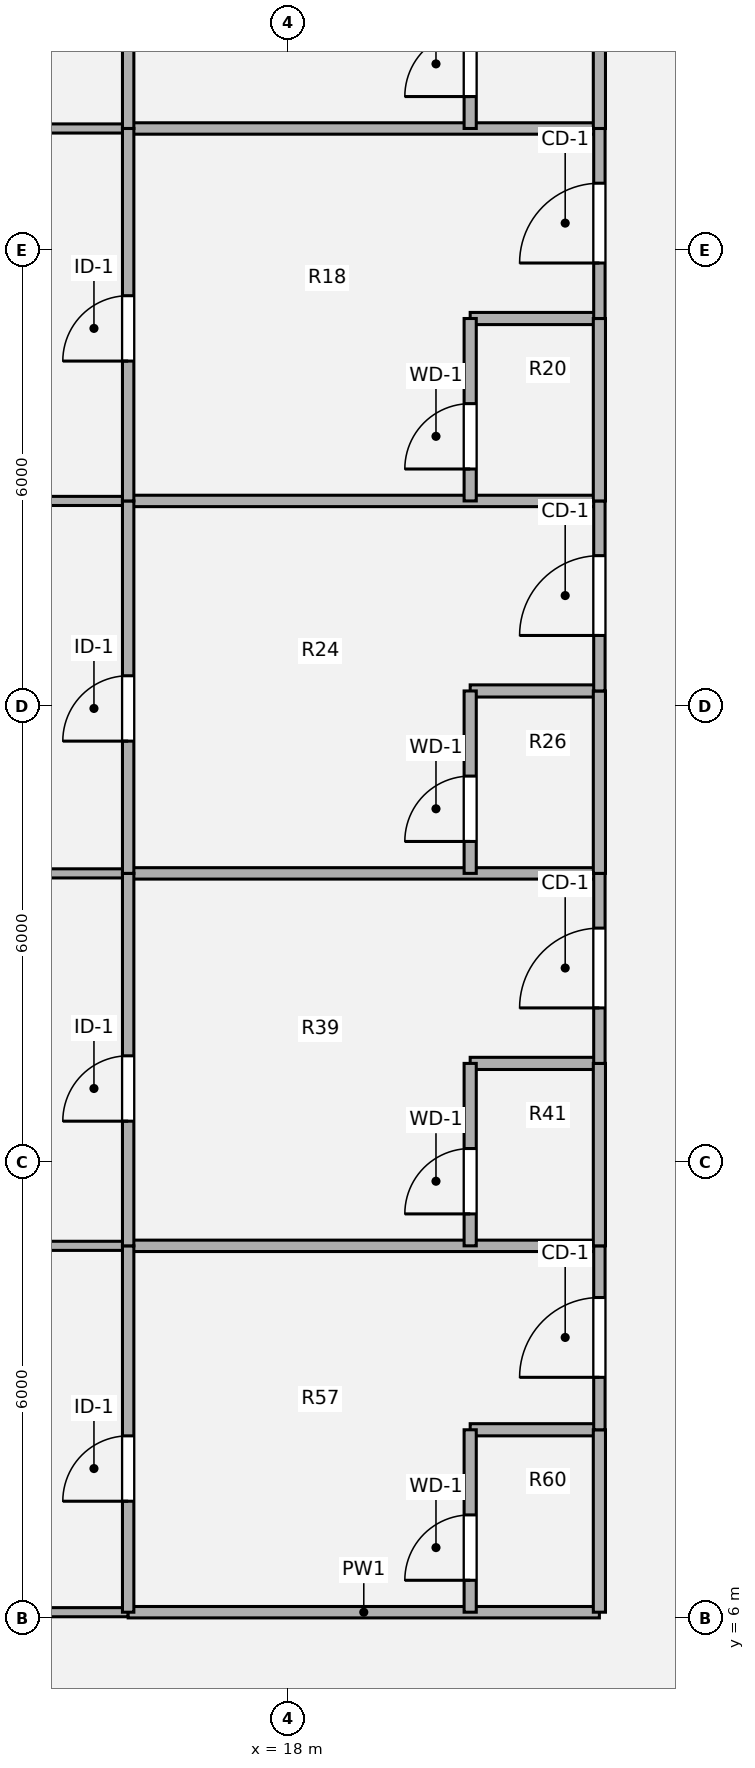
"""IFC4 building model, lengths in metres.
Left out: names, types, materials, properties, quantities, classifications, styles, units other than length and angle.
Written with IfcOpenShell. Run it as: python <this file> out.ifc"""

import sys

from ifc_helpers import new_model, si_unit, direction, frame, frame_2d, origin, origin_2d, place, context, subcontext, project, spatial, rectangle, extrude, source, transform, mapped, element, fill, save


model = new_model("IFC4")
c1 = context("Model", 3, precision=1e-05, world=origin(), true_north=direction((0.0, 1.0)))
c2 = subcontext(c1, "Body", "Model", "MODEL_VIEW")
j1 = project(units=[si_unit("LENGTHUNIT", "METRE"), si_unit("PLANEANGLEUNIT", "RADIAN")], contexts=[c1])
p1 = place(None, origin())
s1 = spatial("IfcSite", under=j1, at=p1, CompositionType="ELEMENT")
p2 = place(p1, origin())
s2 = spatial("IfcBuilding", under=s1, at=p2, CompositionType="ELEMENT")
p3 = place(p2, frame((0.0, 0.0, 64.8)))
s3 = spatial("IfcBuildingStorey", under=s2, at=p3, CompositionType="ELEMENT", Elevation=64.8)
p4 = place(p3, frame((12.08, 6.08, 0.0), z_axis=(0.0, 0.0, 1.0), x_axis=(1.0, 0.0, 0.0)))
e1 = element("IfcWall", 1, at=p4, inside=s3, PredefinedType="PARTITIONING", context=c2, shape_type="SweptSolid", body=[
    extrude(rectangle(XDim=3.82, YDim=0.12, at=frame_2d((1.91, 0.0))), origin(), (0.0, 0.0, 1.0), 3.5),
])
p5 = place(p3, frame((15.9, 6.08, 0.0), z_axis=(0.0, 0.0, 1.0), x_axis=(1.0, 0.0, 0.0)))
e2 = element("IfcWall", 2, at=p5, inside=s3, PredefinedType="PARTITIONING", context=c2, shape_type="SweptSolid", body=[
    extrude(rectangle(XDim=6.2, YDim=0.15, at=frame_2d((3.1, 0.0))), origin(), (0.0, 0.0, 1.0), 3.5),
])
p6 = place(p3, frame((20.4, 8.48, 0.0), z_axis=(0.0, 0.0, 1.0), x_axis=(1.0, 0.0, 0.0)))
e3 = element("IfcWall", 3, at=p6, inside=s3, PredefinedType="PLUMBINGWALL", context=c2, shape_type="SweptSolid", body=[
    extrude(rectangle(XDim=1.7, YDim=0.16, at=frame_2d((0.85, 0.0))), origin(), (0.0, 0.0, 1.0), 3.5),
])
p7 = place(p3, frame((12.08, 10.9, 0.0), z_axis=(0.0, 0.0, 1.0), x_axis=(1.0, 0.0, 0.0)))
e4 = element("IfcWall", 4, at=p7, inside=s3, PredefinedType="PARTITIONING", context=c2, shape_type="SweptSolid", body=[
    extrude(rectangle(XDim=3.82, YDim=0.12, at=frame_2d((1.91, 0.0))), origin(), (0.0, 0.0, 1.0), 3.5),
])
p8 = place(p3, frame((15.9, 10.9, 0.0), z_axis=(0.0, 0.0, 1.0), x_axis=(1.0, 0.0, 0.0)))
e5 = element("IfcWall", 5, at=p8, inside=s3, PredefinedType="PARTITIONING", context=c2, shape_type="SweptSolid", body=[
    extrude(rectangle(XDim=6.2, YDim=0.15, at=frame_2d((3.1, 0.0))), origin(), (0.0, 0.0, 1.0), 3.5),
])
p9 = place(p3, frame((20.4, 13.3, 0.0), z_axis=(0.0, 0.0, 1.0), x_axis=(1.0, 0.0, 0.0)))
e6 = element("IfcWall", 6, at=p9, inside=s3, PredefinedType="PLUMBINGWALL", context=c2, shape_type="SweptSolid", body=[
    extrude(rectangle(XDim=1.7, YDim=0.16, at=frame_2d((0.85, 0.0))), origin(), (0.0, 0.0, 1.0), 3.5),
])
p10 = place(p3, frame((12.08, 15.8, 0.0), z_axis=(0.0, 0.0, 1.0), x_axis=(1.0, 0.0, 0.0)))
e7 = element("IfcWall", 7, at=p10, inside=s3, PredefinedType="PARTITIONING", context=c2, shape_type="SweptSolid", body=[
    extrude(rectangle(XDim=3.82, YDim=0.12, at=frame_2d((1.91, 0.0))), origin(), (0.0, 0.0, 1.0), 3.5),
])
p11 = place(p3, frame((15.9, 15.8, 0.0), z_axis=(0.0, 0.0, 1.0), x_axis=(1.0, 0.0, 0.0)))
e8 = element("IfcWall", 8, at=p11, inside=s3, PredefinedType="PARTITIONING", context=c2, shape_type="SweptSolid", body=[
    extrude(rectangle(XDim=6.2, YDim=0.15, at=frame_2d((3.1, 0.0))), origin(), (0.0, 0.0, 1.0), 3.5),
])
p12 = place(p3, frame((20.4, 18.2, 0.0), z_axis=(0.0, 0.0, 1.0), x_axis=(1.0, 0.0, 0.0)))
e9 = element("IfcWall", 9, at=p12, inside=s3, PredefinedType="PLUMBINGWALL", context=c2, shape_type="SweptSolid", body=[
    extrude(rectangle(XDim=1.7, YDim=0.16, at=frame_2d((0.85, 0.0))), origin(), (0.0, 0.0, 1.0), 2.715),
])
p13 = place(p3, frame((12.08, 20.7, 0.0), z_axis=(0.0, 0.0, 1.0), x_axis=(1.0, 0.0, 0.0)))
e10 = element("IfcWall", 10, at=p13, inside=s3, PredefinedType="PARTITIONING", context=c2, shape_type="SweptSolid", body=[
    extrude(rectangle(XDim=3.82, YDim=0.12, at=frame_2d((1.91, 0.0))), origin(), (0.0, 0.0, 1.0), 2.982),
])
p14 = place(p3, frame((15.9, 20.7, 0.0), z_axis=(0.0, 0.0, 1.0), x_axis=(1.0, 0.0, 0.0)))
e11 = element("IfcWall", 11, at=p14, inside=s3, PredefinedType="PARTITIONING", context=c2, shape_type="SweptSolid", body=[
    extrude(rectangle(XDim=6.2, YDim=0.15, at=frame_2d((3.1, 0.0))), origin(), (0.0, 0.0, 1.0), 2.982),
])
p15 = place(p3, frame((20.4, 23.1, 0.0), z_axis=(0.0, 0.0, 1.0), x_axis=(1.0, 0.0, 0.0)))
e12 = element("IfcWall", 12, at=p15, inside=s3, PredefinedType="PLUMBINGWALL", context=c2, shape_type="SweptSolid", body=[
    extrude(rectangle(XDim=1.7, YDim=0.16, at=frame_2d((0.85, 0.0))), origin(), (0.0, 0.0, 1.0), 3.055),
])
p16 = place(p3, frame((12.08, 25.6, 0.0), z_axis=(0.0, 0.0, 1.0), x_axis=(1.0, 0.0, 0.0)))
e13 = element("IfcWall", 13, at=p16, inside=s3, PredefinedType="PARTITIONING", context=c2, shape_type="SweptSolid", body=[
    extrude(rectangle(XDim=3.82, YDim=0.12, at=frame_2d((1.91, 0.0))), origin(), (0.0, 0.0, 1.0), 2.982),
])
p17 = place(p3, frame((15.9, 25.6, 0.0), z_axis=(0.0, 0.0, 1.0), x_axis=(1.0, 0.0, 0.0)))
e14 = element("IfcWall", 14, at=p17, inside=s3, PredefinedType="PARTITIONING", context=c2, shape_type="SweptSolid", body=[
    extrude(rectangle(XDim=6.2, YDim=0.15, at=frame_2d((3.1, 0.0))), origin(), (0.0, 0.0, 1.0), 2.982),
])
p18 = place(p3, frame((15.9, 6.08, 0.0), z_axis=(0.0, 0.0, 1.0), x_axis=(0.0, 1.0, 0.0)))
e15 = element("IfcWall", 15, at=p18, inside=s3, PredefinedType="PARTITIONING", context=c2, shape_type="SweptSolid", body=[
    extrude(rectangle(XDim=4.82, YDim=0.15, at=frame_2d((2.41, 0.0))), origin(), (0.0, 0.0, 1.0), 3.5),
])
p19 = place(p18, frame((1.46, 0.0, 0.0)))
e16 = element("IfcOpeningElement", 16, at=p19, cuts=e15, PredefinedType="OPENING", context=c2, shape_type="SweptSolid", body=[
    extrude(rectangle(XDim=0.86, YDim=2.1, at=origin_2d()), frame((0.43, 0.085, 1.05), z_axis=(0.0, -1.0, 0.0), x_axis=(1.0, 0.0, 0.0)), (0.0, 0.0, 1.0), 0.17),
])
p20 = place(p3, frame((15.9, 10.9, 0.0), z_axis=(0.0, 0.0, 1.0), x_axis=(0.0, 1.0, 0.0)))
e17 = element("IfcWall", 17, at=p20, inside=s3, PredefinedType="PARTITIONING", context=c2, shape_type="SweptSolid", body=[
    extrude(rectangle(XDim=4.9, YDim=0.15, at=frame_2d((2.45, 0.0))), origin(), (0.0, 0.0, 1.0), 3.5),
])
p21 = place(p20, frame((1.64, 0.0, 0.0)))
e18 = element("IfcOpeningElement", 18, at=p21, cuts=e17, PredefinedType="OPENING", context=c2, shape_type="SweptSolid", body=[
    extrude(rectangle(XDim=0.86, YDim=2.1, at=origin_2d()), frame((0.43, 0.085, 1.05), z_axis=(0.0, -1.0, 0.0), x_axis=(1.0, 0.0, 0.0)), (0.0, 0.0, 1.0), 0.17),
])
p22 = place(p3, frame((15.9, 15.8, 0.0), z_axis=(0.0, 0.0, 1.0), x_axis=(0.0, 1.0, 0.0)))
e19 = element("IfcWall", 19, at=p22, inside=s3, PredefinedType="PARTITIONING", context=c2, shape_type="SweptSolid", body=[
    extrude(rectangle(XDim=4.9, YDim=0.15, at=frame_2d((2.45, 0.0))), origin(), (0.0, 0.0, 1.0), 3.5),
])
p23 = place(p22, frame((1.74, 0.0, 0.0)))
e20 = element("IfcOpeningElement", 20, at=p23, cuts=e19, PredefinedType="OPENING", context=c2, shape_type="SweptSolid", body=[
    extrude(rectangle(XDim=0.86, YDim=2.1, at=origin_2d()), frame((0.43, 0.085, 1.05), z_axis=(0.0, -1.0, 0.0), x_axis=(1.0, 0.0, 0.0)), (0.0, 0.0, 1.0), 0.17),
])
p24 = place(p3, frame((15.9, 20.7, 0.0), z_axis=(0.0, 0.0, 1.0), x_axis=(0.0, 1.0, 0.0)))
e21 = element("IfcWall", 21, at=p24, inside=s3, PredefinedType="PARTITIONING", context=c2, shape_type="SweptSolid", body=[
    extrude(rectangle(XDim=4.9, YDim=0.15, at=frame_2d((2.45, 0.0))), origin(), (0.0, 0.0, 1.0), 3.5),
])
p25 = place(p24, frame((1.84, 0.0, 0.0)))
e22 = element("IfcOpeningElement", 22, at=p25, cuts=e21, PredefinedType="OPENING", context=c2, shape_type="SweptSolid", body=[
    extrude(rectangle(XDim=0.86, YDim=2.1, at=origin_2d()), frame((0.43, 0.085, 1.05), z_axis=(0.0, -1.0, 0.0), x_axis=(1.0, 0.0, 0.0)), (0.0, 0.0, 1.0), 0.17),
])
p26 = place(p3, frame((15.9, 25.6, 0.0), z_axis=(0.0, 0.0, 1.0), x_axis=(0.0, 1.0, 0.0)))
e23 = element("IfcWall", 23, at=p26, inside=s3, PredefinedType="PARTITIONING", context=c2, shape_type="SweptSolid", body=[
    extrude(rectangle(XDim=4.9, YDim=0.15, at=frame_2d((2.45, 0.0))), origin(), (0.0, 0.0, 1.0), 3.5),
])
p27 = place(p26, frame((1.94, 0.0, 0.0)))
e24 = element("IfcOpeningElement", 24, at=p27, cuts=e23, PredefinedType="OPENING", context=c2, shape_type="SweptSolid", body=[
    extrude(rectangle(XDim=0.86, YDim=2.1, at=origin_2d()), frame((0.43, 0.085, 1.05), z_axis=(0.0, -1.0, 0.0), x_axis=(1.0, 0.0, 0.0)), (0.0, 0.0, 1.0), 0.17),
])
p28 = place(p3, frame((20.4, 6.08, 0.0), z_axis=(0.0, 0.0, 1.0), x_axis=(0.0, 1.0, 0.0)))
e25 = element("IfcWall", 25, at=p28, inside=s3, PredefinedType="PLUMBINGWALL", context=c2, shape_type="SweptSolid", body=[
    extrude(rectangle(XDim=2.4, YDim=0.16, at=frame_2d((1.2, 0.0))), origin(), (0.0, 0.0, 1.0), 3.5),
])
p29 = place(p28, frame((0.42, 0.0, 0.0)))
e26 = element("IfcOpeningElement", 26, at=p29, cuts=e25, PredefinedType="OPENING", context=c2, shape_type="SweptSolid", body=[
    extrude(rectangle(XDim=0.86, YDim=2.1, at=origin_2d()), frame((0.43, 0.09, 1.05), z_axis=(0.0, -1.0, 0.0), x_axis=(1.0, 0.0, 0.0)), (0.0, 0.0, 1.0), 0.18),
])
p30 = place(p3, frame((20.4, 10.9, 0.0), z_axis=(0.0, 0.0, 1.0), x_axis=(0.0, 1.0, 0.0)))
e27 = element("IfcWall", 27, at=p30, inside=s3, PredefinedType="PLUMBINGWALL", context=c2, shape_type="SweptSolid", body=[
    extrude(rectangle(XDim=2.4, YDim=0.16, at=frame_2d((1.2, 0.0))), origin(), (0.0, 0.0, 1.0), 3.5),
])
p31 = place(p30, frame((0.42, 0.0, 0.0)))
e28 = element("IfcOpeningElement", 28, at=p31, cuts=e27, PredefinedType="OPENING", context=c2, shape_type="SweptSolid", body=[
    extrude(rectangle(XDim=0.86, YDim=2.1, at=origin_2d()), frame((0.43, 0.09, 1.05), z_axis=(0.0, -1.0, 0.0), x_axis=(1.0, 0.0, 0.0)), (0.0, 0.0, 1.0), 0.18),
])
p32 = place(p3, frame((20.4, 15.8, 0.0), z_axis=(0.0, 0.0, 1.0), x_axis=(0.0, 1.0, 0.0)))
e29 = element("IfcWall", 29, at=p32, inside=s3, PredefinedType="PLUMBINGWALL", context=c2, shape_type="SweptSolid", body=[
    extrude(rectangle(XDim=2.4, YDim=0.16, at=frame_2d((1.2, 0.0))), origin(), (0.0, 0.0, 1.0), 3.5),
])
p33 = place(p32, frame((0.42, 0.0, 0.0)))
e30 = element("IfcOpeningElement", 30, at=p33, cuts=e29, PredefinedType="OPENING", context=c2, shape_type="SweptSolid", body=[
    extrude(rectangle(XDim=0.86, YDim=2.1, at=origin_2d()), frame((0.43, 0.09, 1.05), z_axis=(0.0, -1.0, 0.0), x_axis=(1.0, 0.0, 0.0)), (0.0, 0.0, 1.0), 0.18),
])
p34 = place(p3, frame((20.4, 20.7, 0.0), z_axis=(0.0, 0.0, 1.0), x_axis=(0.0, 1.0, 0.0)))
e31 = element("IfcWall", 31, at=p34, inside=s3, PredefinedType="PLUMBINGWALL", context=c2, shape_type="SweptSolid", body=[
    extrude(rectangle(XDim=2.4, YDim=0.16, at=frame_2d((1.2, 0.0))), origin(), (0.0, 0.0, 1.0), 3.5),
])
p35 = place(p34, frame((0.42, 0.0, 0.0)))
e32 = element("IfcOpeningElement", 32, at=p35, cuts=e31, PredefinedType="OPENING", context=c2, shape_type="SweptSolid", body=[
    extrude(rectangle(XDim=0.86, YDim=2.1, at=origin_2d()), frame((0.43, 0.09, 1.05), z_axis=(0.0, -1.0, 0.0), x_axis=(1.0, 0.0, 0.0)), (0.0, 0.0, 1.0), 0.18),
])
p36 = place(p3, frame((20.4, 25.6, 0.0), z_axis=(0.0, 0.0, 1.0), x_axis=(0.0, 1.0, 0.0)))
e33 = element("IfcWall", 33, at=p36, inside=s3, PredefinedType="PLUMBINGWALL", context=c2, shape_type="SweptSolid", body=[
    extrude(rectangle(XDim=2.4, YDim=0.16, at=frame_2d((1.2, 0.0))), origin(), (0.0, 0.0, 1.0), 3.5),
])
p37 = place(p36, frame((0.42, 0.0, 0.0)))
e34 = element("IfcOpeningElement", 34, at=p37, cuts=e33, PredefinedType="OPENING", context=c2, shape_type="SweptSolid", body=[
    extrude(rectangle(XDim=0.86, YDim=2.1, at=origin_2d()), frame((0.43, 0.09, 1.05), z_axis=(0.0, -1.0, 0.0), x_axis=(1.0, 0.0, 0.0)), (0.0, 0.0, 1.0), 0.18),
])
p38 = place(p3, frame((22.1, 6.08, 0.0), z_axis=(0.0, 0.0, 1.0), x_axis=(0.0, 1.0, 0.0)))
e35 = element("IfcWall", 35, at=p38, inside=s3, PredefinedType="PLUMBINGWALL", context=c2, shape_type="SweptSolid", body=[
    extrude(rectangle(XDim=2.4, YDim=0.16, at=frame_2d((1.2, 0.0))), origin(), (0.0, 0.0, 1.0), 3.5),
])
p39 = place(p3, frame((22.1, 8.48, 0.0), z_axis=(0.0, 0.0, 1.0), x_axis=(0.0, 1.0, 0.0)))
e36 = element("IfcWall", 36, at=p39, inside=s3, PredefinedType="PARTITIONING", context=c2, shape_type="SweptSolid", body=[
    extrude(rectangle(XDim=2.42, YDim=0.15, at=frame_2d((1.21, 0.0))), origin(), (0.0, 0.0, 1.0), 3.5),
])
p40 = place(p39, frame((0.69, 0.0, 0.0)))
e37 = element("IfcOpeningElement", 37, at=p40, cuts=e36, PredefinedType="OPENING", context=c2, shape_type="SweptSolid", body=[
    extrude(rectangle(XDim=1.05, YDim=2.1, at=origin_2d()), frame((0.525, 0.085, 1.05), z_axis=(0.0, -1.0, 0.0), x_axis=(1.0, 0.0, 0.0)), (0.0, 0.0, 1.0), 0.17),
])
p41 = place(p3, frame((22.1, 10.9, 0.0), z_axis=(0.0, 0.0, 1.0), x_axis=(0.0, 1.0, 0.0)))
e38 = element("IfcWall", 38, at=p41, inside=s3, PredefinedType="PLUMBINGWALL", context=c2, shape_type="SweptSolid", body=[
    extrude(rectangle(XDim=2.4, YDim=0.16, at=frame_2d((1.2, 0.0))), origin(), (0.0, 0.0, 1.0), 3.5),
])
p42 = place(p3, frame((22.1, 13.3, 0.0), z_axis=(0.0, 0.0, 1.0), x_axis=(0.0, 1.0, 0.0)))
e39 = element("IfcWall", 39, at=p42, inside=s3, PredefinedType="PARTITIONING", context=c2, shape_type="SweptSolid", body=[
    extrude(rectangle(XDim=2.5, YDim=0.15, at=frame_2d((1.25, 0.0))), origin(), (0.0, 0.0, 1.0), 3.5),
])
p43 = place(p42, frame((0.73, 0.0, 0.0)))
e40 = element("IfcOpeningElement", 40, at=p43, cuts=e39, PredefinedType="OPENING", context=c2, shape_type="SweptSolid", body=[
    extrude(rectangle(XDim=1.05, YDim=2.1, at=origin_2d()), frame((0.525, 0.085, 1.05), z_axis=(0.0, -1.0, 0.0), x_axis=(1.0, 0.0, 0.0)), (0.0, 0.0, 1.0), 0.17),
])
p44 = place(p3, frame((22.1, 15.8, 0.0), z_axis=(0.0, 0.0, 1.0), x_axis=(0.0, 1.0, 0.0)))
e41 = element("IfcWall", 41, at=p44, inside=s3, PredefinedType="PLUMBINGWALL", context=c2, shape_type="SweptSolid", body=[
    extrude(rectangle(XDim=2.4, YDim=0.16, at=frame_2d((1.2, 0.0))), origin(), (0.0, 0.0, 1.0), 3.5),
])
p45 = place(p3, frame((22.1, 18.2, 0.0), z_axis=(0.0, 0.0, 1.0), x_axis=(0.0, 1.0, 0.0)))
e42 = element("IfcWall", 42, at=p45, inside=s3, PredefinedType="PARTITIONING", context=c2, shape_type="SweptSolid", body=[
    extrude(rectangle(XDim=2.5, YDim=0.15, at=frame_2d((1.25, 0.0))), origin(), (0.0, 0.0, 1.0), 3.5),
])
p46 = place(p45, frame((0.73, 0.0, 0.0)))
e43 = element("IfcOpeningElement", 43, at=p46, cuts=e42, PredefinedType="OPENING", context=c2, shape_type="SweptSolid", body=[
    extrude(rectangle(XDim=1.05, YDim=2.1, at=origin_2d()), frame((0.525, 0.085, 1.05), z_axis=(0.0, -1.0, 0.0), x_axis=(1.0, 0.0, 0.0)), (0.0, 0.0, 1.0), 0.17),
])
p47 = place(p3, frame((22.1, 20.7, 0.0), z_axis=(0.0, 0.0, 1.0), x_axis=(0.0, 1.0, 0.0)))
e44 = element("IfcWall", 44, at=p47, inside=s3, PredefinedType="PLUMBINGWALL", context=c2, shape_type="SweptSolid", body=[
    extrude(rectangle(XDim=2.4, YDim=0.16, at=frame_2d((1.2, 0.0))), origin(), (0.0, 0.0, 1.0), 3.5),
])
p48 = place(p3, frame((22.1, 23.1, 0.0), z_axis=(0.0, 0.0, 1.0), x_axis=(0.0, 1.0, 0.0)))
e45 = element("IfcWall", 45, at=p48, inside=s3, PredefinedType="PARTITIONING", context=c2, shape_type="SweptSolid", body=[
    extrude(rectangle(XDim=2.5, YDim=0.15, at=frame_2d((1.25, 0.0))), origin(), (0.0, 0.0, 1.0), 3.5),
])
p49 = place(p48, frame((0.73, 0.0, 0.0)))
e46 = element("IfcOpeningElement", 46, at=p49, cuts=e45, PredefinedType="OPENING", context=c2, shape_type="SweptSolid", body=[
    extrude(rectangle(XDim=1.05, YDim=2.1, at=origin_2d()), frame((0.525, 0.085, 1.05), z_axis=(0.0, -1.0, 0.0), x_axis=(1.0, 0.0, 0.0)), (0.0, 0.0, 1.0), 0.17),
])
p50 = place(p3, frame((22.1, 25.6, 0.0), z_axis=(0.0, 0.0, 1.0), x_axis=(0.0, 1.0, 0.0)))
e47 = element("IfcWall", 47, at=p50, inside=s3, PredefinedType="PLUMBINGWALL", context=c2, shape_type="SweptSolid", body=[
    extrude(rectangle(XDim=2.4, YDim=0.16, at=frame_2d((1.2, 0.0))), origin(), (0.0, 0.0, 1.0), 3.5),
])
m1 = source(origin(), c2, "Body", "SweptSolid", [
    extrude(rectangle(XDim=0.86, YDim=2.1, at=origin_2d()), frame((0.43, 0.025, 1.05), z_axis=(0.0, -1.0, 0.0), x_axis=(1.0, 0.0, 0.0)), (0.0, 0.0, 1.0), 0.05),
])
p51 = place(p19, origin())
e48 = element("IfcDoor", 48, at=p51, inside=s3, OperationType="SINGLE_SWING_LEFT", PredefinedType="DOOR", context=c2, shape_type="MappedRepresentation", body=[
    mapped(m1, transform((0.0, 0.0, 0.0), x_axis=(1.0, 0.0, 0.0), y_axis=(0.0, 1.0, 0.0), z_axis=(0.0, 0.0, 1.0), scale=1.0)),
])
fill(e16, e48)
p52 = place(p21, origin())
e49 = element("IfcDoor", 49, at=p52, inside=s3, OperationType="SINGLE_SWING_LEFT", PredefinedType="DOOR", context=c2, shape_type="MappedRepresentation", body=[
    mapped(m1, transform((0.0, 0.0, 0.0), x_axis=(1.0, 0.0, 0.0), y_axis=(0.0, 1.0, 0.0), z_axis=(0.0, 0.0, 1.0), scale=1.0)),
])
fill(e18, e49)
p53 = place(p23, origin())
e50 = element("IfcDoor", 50, at=p53, inside=s3, OperationType="SINGLE_SWING_LEFT", PredefinedType="DOOR", context=c2, shape_type="MappedRepresentation", body=[
    mapped(m1, transform((0.0, 0.0, 0.0), x_axis=(1.0, 0.0, 0.0), y_axis=(0.0, 1.0, 0.0), z_axis=(0.0, 0.0, 1.0), scale=1.0)),
])
fill(e20, e50)
p54 = place(p25, origin())
e51 = element("IfcDoor", 51, at=p54, inside=s3, OperationType="SINGLE_SWING_LEFT", PredefinedType="DOOR", context=c2, shape_type="MappedRepresentation", body=[
    mapped(m1, transform((0.0, 0.0, 0.0), x_axis=(1.0, 0.0, 0.0), y_axis=(0.0, 1.0, 0.0), z_axis=(0.0, 0.0, 1.0), scale=1.0)),
])
fill(e22, e51)
m2 = source(origin(), c2, "Body", "SweptSolid", [
    extrude(rectangle(XDim=0.86, YDim=2.1, at=origin_2d()), frame((0.43, 0.025, 1.05), z_axis=(0.0, -1.0, 0.0), x_axis=(1.0, 0.0, 0.0)), (0.0, 0.0, 1.0), 0.05),
])
p55 = place(p29, origin())
e52 = element("IfcDoor", 52, at=p55, inside=s3, OperationType="SINGLE_SWING_LEFT", PredefinedType="DOOR", context=c2, shape_type="MappedRepresentation", body=[
    mapped(m2, transform((0.0, 0.0, 0.0), x_axis=(1.0, 0.0, 0.0), y_axis=(0.0, 1.0, 0.0), z_axis=(0.0, 0.0, 1.0), scale=1.0)),
])
fill(e26, e52)
p56 = place(p31, origin())
e53 = element("IfcDoor", 53, at=p56, inside=s3, OperationType="SINGLE_SWING_LEFT", PredefinedType="DOOR", context=c2, shape_type="MappedRepresentation", body=[
    mapped(m2, transform((0.0, 0.0, 0.0), x_axis=(1.0, 0.0, 0.0), y_axis=(0.0, 1.0, 0.0), z_axis=(0.0, 0.0, 1.0), scale=1.0)),
])
fill(e28, e53)
p57 = place(p33, origin())
e54 = element("IfcDoor", 54, at=p57, inside=s3, OperationType="SINGLE_SWING_LEFT", PredefinedType="DOOR", context=c2, shape_type="MappedRepresentation", body=[
    mapped(m2, transform((0.0, 0.0, 0.0), x_axis=(1.0, 0.0, 0.0), y_axis=(0.0, 1.0, 0.0), z_axis=(0.0, 0.0, 1.0), scale=1.0)),
])
fill(e30, e54)
p58 = place(p35, origin())
e55 = element("IfcDoor", 55, at=p58, inside=s3, OperationType="SINGLE_SWING_LEFT", PredefinedType="DOOR", context=c2, shape_type="MappedRepresentation", body=[
    mapped(m2, transform((0.0, 0.0, 0.0), x_axis=(1.0, 0.0, 0.0), y_axis=(0.0, 1.0, 0.0), z_axis=(0.0, 0.0, 1.0), scale=1.0)),
])
fill(e32, e55)
p59 = place(p37, origin())
e56 = element("IfcDoor", 56, at=p59, inside=s3, OperationType="SINGLE_SWING_LEFT", PredefinedType="DOOR", context=c2, shape_type="MappedRepresentation", body=[
    mapped(m2, transform((0.0, 0.0, 0.0), x_axis=(1.0, 0.0, 0.0), y_axis=(0.0, 1.0, 0.0), z_axis=(0.0, 0.0, 1.0), scale=1.0)),
])
fill(e34, e56)
m3 = source(origin(), c2, "Body", "SweptSolid", [
    extrude(rectangle(XDim=1.05, YDim=2.1, at=origin_2d()), frame((0.525, 0.025, 1.05), z_axis=(0.0, -1.0, 0.0), x_axis=(1.0, 0.0, 0.0)), (0.0, 0.0, 1.0), 0.05),
])
p60 = place(p40, origin())
e57 = element("IfcDoor", 57, at=p60, inside=s3, OperationType="SINGLE_SWING_LEFT", PredefinedType="DOOR", context=c2, shape_type="MappedRepresentation", body=[
    mapped(m3, transform((0.0, 0.0, 0.0), x_axis=(1.0, 0.0, 0.0), y_axis=(0.0, 1.0, 0.0), z_axis=(0.0, 0.0, 1.0), scale=1.0)),
])
fill(e37, e57)
p61 = place(p43, origin())
e58 = element("IfcDoor", 58, at=p61, inside=s3, OperationType="SINGLE_SWING_LEFT", PredefinedType="DOOR", context=c2, shape_type="MappedRepresentation", body=[
    mapped(m3, transform((0.0, 0.0, 0.0), x_axis=(1.0, 0.0, 0.0), y_axis=(0.0, 1.0, 0.0), z_axis=(0.0, 0.0, 1.0), scale=1.0)),
])
fill(e40, e58)
p62 = place(p46, origin())
e59 = element("IfcDoor", 59, at=p62, inside=s3, OperationType="SINGLE_SWING_LEFT", PredefinedType="DOOR", context=c2, shape_type="MappedRepresentation", body=[
    mapped(m3, transform((0.0, 0.0, 0.0), x_axis=(1.0, 0.0, 0.0), y_axis=(0.0, 1.0, 0.0), z_axis=(0.0, 0.0, 1.0), scale=1.0)),
])
fill(e43, e59)
p63 = place(p49, origin())
e60 = element("IfcDoor", 60, at=p63, inside=s3, OperationType="SINGLE_SWING_LEFT", PredefinedType="DOOR", context=c2, shape_type="MappedRepresentation", body=[
    mapped(m3, transform((0.0, 0.0, 0.0), x_axis=(1.0, 0.0, 0.0), y_axis=(0.0, 1.0, 0.0), z_axis=(0.0, 0.0, 1.0), scale=1.0)),
])
fill(e46, e60)
save(model, sys.argv[1])
